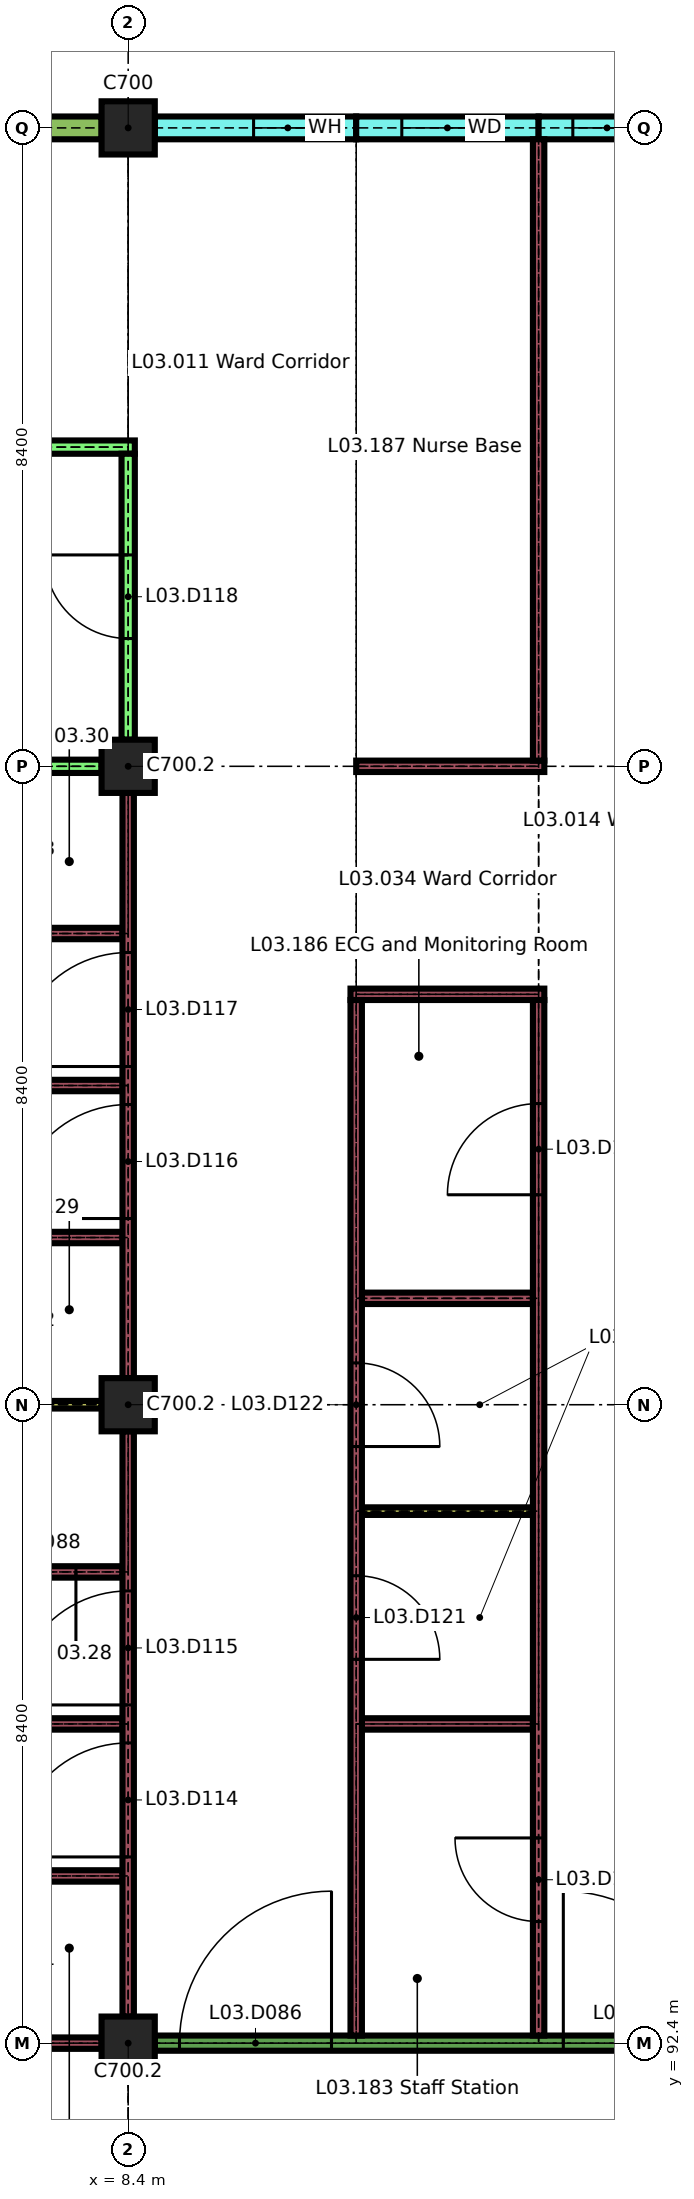
"""IFC4 building model, lengths in metres.
Left out: names, types, materials, properties, quantities, classifications, styles, units other than length and angle.
Written with IfcOpenShell. Run it as: python <this file> out.ifc"""

import sys

from ifc_helpers import new_model, si_unit, direction, frame, frame_2d, origin, origin_2d, place, context, subcontext, project, spatial, rectangle, extrude, element, fill, save


model = new_model("IFC4")
c1 = context("Model", 3, precision=1e-05, world=origin(), true_north=direction((0.0, 1.0)))
c2 = subcontext(c1, "Body", "Model", "MODEL_VIEW")
j1 = project(units=[si_unit("LENGTHUNIT", "METRE"), si_unit("PLANEANGLEUNIT", "RADIAN")], contexts=[c1])
p1 = place(None, origin())
s1 = spatial("IfcSite", under=j1, at=p1, CompositionType="ELEMENT")
p2 = place(p1, origin())
s2 = spatial("IfcBuilding", under=s1, at=p2, CompositionType="ELEMENT")
p3 = place(p2, frame((0.0, 0.0, 15.3)))
s3 = spatial("IfcBuildingStorey", under=s2, at=p3, CompositionType="ELEMENT", Elevation=15.3)
for number, where, z_axis, x_axis in (
    (1, (8.4, 92.4, 0.0), (0.0, 0.0, 1.0), (1.0, 0.0, 0.0)),
    (2, (8.4, 100.8, 0.0), (0.0, 0.0, 1.0), (1.0, 0.0, 0.0)),
    (3, (8.4, 109.2, 0.0), (0.0, 0.0, 1.0), (1.0, 0.0, 0.0)),
    (4, (8.4, 117.6, 0.0), (0.0, 0.0, 1.0), (1.0, 0.0, 0.0)),
):
    element("IfcColumn", number, at=place(p3, frame(where, z_axis=z_axis, x_axis=x_axis)), inside=s3, PredefinedType="COLUMN", context=c2, shape_type="SweptSolid", body=[
        extrude(rectangle(XDim=0.7, YDim=0.7, at=origin_2d()), origin(), (0.0, 0.0, 1.0), 3.26),
    ])
p4 = place(p3, frame((7.0, 117.6, 0.0), z_axis=(0.0, 0.0, 1.0), x_axis=(1.0, 0.0, 0.0)))
e5 = element("IfcWall", 5, at=p4, inside=s3, PredefinedType="SOLIDWALL", context=c2, shape_type="SweptSolid", body=[
    extrude(rectangle(XDim=1.05, YDim=0.3, at=frame_2d((0.525, 0.0))), origin(), (0.0, 0.0, 1.0), 2.96),
])
p5 = place(p3, frame((8.75, 117.6, 0.0), z_axis=(0.0, 0.0, 1.0), x_axis=(1.0, 0.0, 0.0)))
e6 = element("IfcWall", 6, at=p5, inside=s3, PredefinedType="SOLIDWALL", context=c2, shape_type="SweptSolid", body=[
    extrude(rectangle(XDim=2.65, YDim=0.3, at=frame_2d((1.325, 0.0))), origin(), (0.0, 0.0, 1.0), 3.26),
])
p6 = place(p5, frame((1.3, 0.0, 0.9)))
e7 = element("IfcOpeningElement", 7, at=p6, cuts=e6, PredefinedType="OPENING", context=c2, shape_type="SweptSolid", body=[
    extrude(rectangle(XDim=0.9, YDim=1.5, at=frame_2d((0.45, 0.75))), frame((0.0, 0.16, 0.0), z_axis=(0.0, -1.0, 0.0), x_axis=(1.0, 0.0, 0.0)), (0.0, 0.0, 1.0), 0.32),
])
p7 = place(p3, frame((11.4, 117.6, 0.0), z_axis=(0.0, 0.0, 1.0), x_axis=(1.0, 0.0, 0.0)))
e8 = element("IfcWall", 8, at=p7, inside=s3, PredefinedType="SOLIDWALL", context=c2, shape_type="SweptSolid", body=[
    extrude(rectangle(XDim=2.4, YDim=0.3, at=frame_2d((1.2, 0.0))), origin(), (0.0, 0.0, 1.0), 3.26),
])
p8 = place(p7, frame((0.6, 0.0, 0.9)))
e9 = element("IfcOpeningElement", 9, at=p8, cuts=e8, PredefinedType="OPENING", context=c2, shape_type="SweptSolid", body=[
    extrude(rectangle(XDim=1.2, YDim=1.5, at=frame_2d((0.6, 0.75))), frame((0.0, 0.16, 0.0), z_axis=(0.0, -1.0, 0.0), x_axis=(1.0, 0.0, 0.0)), (0.0, 0.0, 1.0), 0.32),
])
p9 = place(p3, frame((13.8, 117.6, 0.0), z_axis=(0.0, 0.0, 1.0), x_axis=(1.0, 0.0, 0.0)))
e10 = element("IfcWall", 10, at=p9, inside=s3, PredefinedType="SOLIDWALL", context=c2, shape_type="SweptSolid", body=[
    extrude(rectangle(XDim=3.0, YDim=0.3, at=frame_2d((1.5, 0.0))), origin(), (0.0, 0.0, 1.0), 3.26),
])
p10 = place(p9, frame((0.45, 0.0, 0.9)))
e11 = element("IfcOpeningElement", 11, at=p10, cuts=e10, PredefinedType="OPENING", context=c2, shape_type="SweptSolid", body=[
    extrude(rectangle(XDim=0.9, YDim=1.5, at=frame_2d((0.45, 0.75))), frame((0.0, 0.16, 0.0), z_axis=(0.0, -1.0, 0.0), x_axis=(1.0, 0.0, 0.0)), (0.0, 0.0, 1.0), 0.32),
])
p11 = place(p3, frame((0.35, 92.4, 0.0), z_axis=(0.0, 0.0, 1.0), x_axis=(1.0, 0.0, 0.0)))
e12 = element("IfcWall", 12, at=p11, inside=s3, PredefinedType="PARTITIONING", context=c2, shape_type="SweptSolid", body=[
    extrude(rectangle(XDim=7.7, YDim=0.15, at=frame_2d((3.85, 0.0))), origin(), (0.0, 0.0, 1.0), 3.26),
])
p12 = place(p3, frame((8.75, 92.4, 0.0), z_axis=(0.0, 0.0, 1.0), x_axis=(1.0, 0.0, 0.0)))
e13 = element("IfcWall", 13, at=p12, inside=s3, PredefinedType="PARTITIONING", context=c2, shape_type="SweptSolid", body=[
    extrude(rectangle(XDim=7.7, YDim=0.2, at=frame_2d((3.85, 0.0))), origin(), (0.0, 0.0, 1.0), 3.26),
])
p13 = place(p12, frame((0.325, 0.0, 0.0)))
e14 = element("IfcOpeningElement", 14, at=p13, cuts=e13, PredefinedType="OPENING", context=c2, shape_type="SweptSolid", body=[
    extrude(rectangle(XDim=2.0, YDim=2.4, at=frame_2d((1.0, 1.2))), frame((0.0, 0.11, 0.0), z_axis=(0.0, -1.0, 0.0), x_axis=(1.0, 0.0, 0.0)), (0.0, 0.0, 1.0), 0.22),
])
p14 = place(p12, frame((5.375, 0.0, 0.0)))
e15 = element("IfcOpeningElement", 15, at=p14, cuts=e13, PredefinedType="OPENING", context=c2, shape_type="SweptSolid", body=[
    extrude(rectangle(XDim=2.0, YDim=2.4, at=frame_2d((1.0, 1.2))), frame((0.0, 0.11, 0.0), z_axis=(0.0, -1.0, 0.0), x_axis=(1.0, 0.0, 0.0)), (0.0, 0.0, 1.0), 0.22),
])
p15 = place(p3, frame((5.925, 94.6, 0.0), z_axis=(0.0, 0.0, 1.0), x_axis=(1.0, 0.0, 0.0)))
e16 = element("IfcWall", 16, at=p15, inside=s3, PredefinedType="PARTITIONING", context=c2, shape_type="SweptSolid", body=[
    extrude(rectangle(XDim=2.4, YDim=0.15, at=frame_2d((1.2, 0.0))), origin(), (0.0, 0.0, 1.0), 3.26),
])
p16 = place(p3, frame((0.15, 96.6, 0.0), z_axis=(0.0, 0.0, 1.0), x_axis=(1.0, 0.0, 0.0)))
e17 = element("IfcWall", 17, at=p16, inside=s3, PredefinedType="PARTITIONING", context=c2, shape_type="SweptSolid", body=[
    extrude(rectangle(XDim=8.175, YDim=0.15, at=frame_2d((4.087, 0.0))), origin(), (0.0, 0.0, 1.0), 3.26),
])
p17 = place(p3, frame((11.475, 96.6, 0.0), z_axis=(0.0, 0.0, 1.0), x_axis=(1.0, 0.0, 0.0)))
e18 = element("IfcWall", 18, at=p17, inside=s3, PredefinedType="PARTITIONING", context=c2, shape_type="SweptSolid", body=[
    extrude(rectangle(XDim=2.25, YDim=0.15, at=frame_2d((1.125, 0.0))), origin(), (0.0, 0.0, 1.0), 3.26),
])
p18 = place(p3, frame((5.925, 98.6, 0.0), z_axis=(0.0, 0.0, 1.0), x_axis=(1.0, 0.0, 0.0)))
e19 = element("IfcWall", 19, at=p18, inside=s3, PredefinedType="PARTITIONING", context=c2, shape_type="SweptSolid", body=[
    extrude(rectangle(XDim=2.4, YDim=0.15, at=frame_2d((1.2, 0.0))), origin(), (0.0, 0.0, 1.0), 3.26),
])
p19 = place(p18, frame((0.688, 0.0, 0.0)))
e20 = element("IfcOpeningElement", 20, at=p19, cuts=e19, PredefinedType="OPENING", context=c2, shape_type="SweptSolid", body=[
    extrude(rectangle(XDim=1.1, YDim=2.1, at=frame_2d((0.55, 1.05))), frame((0.0, 0.085, 0.0), z_axis=(0.0, -1.0, 0.0), x_axis=(1.0, 0.0, 0.0)), (0.0, 0.0, 1.0), 0.17),
])
p20 = place(p3, frame((11.475, 99.4, 0.0), z_axis=(0.0, 0.0, 1.0), x_axis=(1.0, 0.0, 0.0)))
e21 = element("IfcWall", 21, at=p20, inside=s3, PredefinedType="PARTITIONING", context=c2, shape_type="SweptSolid", body=[
    extrude(rectangle(XDim=2.25, YDim=0.1, at=frame_2d((1.125, 0.0))), origin(), (0.0, 0.0, 1.0), 3.26),
])
p21 = place(p3, frame((6.0, 100.8, 0.0), z_axis=(0.0, 0.0, 1.0), x_axis=(1.0, 0.0, 0.0)))
e22 = element("IfcWall", 22, at=p21, inside=s3, PredefinedType="PARTITIONING", context=c2, shape_type="SweptSolid", body=[
    extrude(rectangle(XDim=2.05, YDim=0.1, at=frame_2d((1.025, 0.0))), origin(), (0.0, 0.0, 1.0), 3.26),
])
p22 = place(p3, frame((11.475, 102.2, 0.0), z_axis=(0.0, 0.0, 1.0), x_axis=(1.0, 0.0, 0.0)))
e23 = element("IfcWall", 23, at=p22, inside=s3, PredefinedType="PARTITIONING", context=c2, shape_type="SweptSolid", body=[
    extrude(rectangle(XDim=2.25, YDim=0.15, at=frame_2d((1.125, 0.0))), origin(), (0.0, 0.0, 1.0), 3.26),
])
p23 = place(p3, frame((5.925, 103.0, 0.0), z_axis=(0.0, 0.0, 1.0), x_axis=(1.0, 0.0, 0.0)))
e24 = element("IfcWall", 24, at=p23, inside=s3, PredefinedType="PARTITIONING", context=c2, shape_type="SweptSolid", body=[
    extrude(rectangle(XDim=2.4, YDim=0.15, at=frame_2d((1.2, 0.0))), origin(), (0.0, 0.0, 1.0), 3.26),
])
p24 = place(p3, frame((0.15, 105.0, 0.0), z_axis=(0.0, 0.0, 1.0), x_axis=(1.0, 0.0, 0.0)))
e25 = element("IfcWall", 25, at=p24, inside=s3, PredefinedType="PARTITIONING", context=c2, shape_type="SweptSolid", body=[
    extrude(rectangle(XDim=8.175, YDim=0.15, at=frame_2d((4.087, 0.0))), origin(), (0.0, 0.0, 1.0), 3.26),
])
p25 = place(p3, frame((11.325, 106.2, 0.0), z_axis=(0.0, 0.0, 1.0), x_axis=(1.0, 0.0, 0.0)))
e26 = element("IfcWall", 26, at=p25, inside=s3, PredefinedType="PARTITIONING", context=c2, shape_type="SweptSolid", body=[
    extrude(rectangle(XDim=2.55, YDim=0.15, at=frame_2d((1.275, 0.0))), origin(), (0.0, 0.0, 1.0), 3.26),
])
p26 = place(p3, frame((5.925, 107.0, 0.0), z_axis=(0.0, 0.0, 1.0), x_axis=(1.0, 0.0, 0.0)))
e27 = element("IfcWall", 27, at=p26, inside=s3, PredefinedType="PARTITIONING", context=c2, shape_type="SweptSolid", body=[
    extrude(rectangle(XDim=2.4, YDim=0.15, at=frame_2d((1.2, 0.0))), origin(), (0.0, 0.0, 1.0), 3.26),
])
p27 = place(p3, frame((0.35, 109.2, 0.0), z_axis=(0.0, 0.0, 1.0), x_axis=(1.0, 0.0, 0.0)))
e28 = element("IfcWall", 28, at=p27, inside=s3, PredefinedType="PARTITIONING", context=c2, shape_type="SweptSolid", body=[
    extrude(rectangle(XDim=7.7, YDim=0.175, at=frame_2d((3.85, 0.0))), origin(), (0.0, 0.0, 1.0), 3.26),
])
p28 = place(p3, frame((11.4, 109.2, 0.0), z_axis=(0.0, 0.0, 1.0), x_axis=(1.0, 0.0, 0.0)))
e29 = element("IfcWall", 29, at=p28, inside=s3, PredefinedType="PARTITIONING", context=c2, shape_type="SweptSolid", body=[
    extrude(rectangle(XDim=2.475, YDim=0.15, at=frame_2d((1.238, 0.0))), origin(), (0.0, 0.0, 1.0), 3.26),
])
p29 = place(p3, frame((0.15, 113.4, 0.0), z_axis=(0.0, 0.0, 1.0), x_axis=(1.0, 0.0, 0.0)))
e30 = element("IfcWall", 30, at=p29, inside=s3, PredefinedType="PARTITIONING", context=c2, shape_type="SweptSolid", body=[
    extrude(rectangle(XDim=8.338, YDim=0.175, at=frame_2d((4.169, 0.0))), origin(), (0.0, 0.0, 1.0), 3.26),
])
p30 = place(p3, frame((8.4, 92.75, 0.0), z_axis=(0.0, 0.0, 1.0), x_axis=(0.0, 1.0, 0.0)))
e31 = element("IfcWall", 31, at=p30, inside=s3, PredefinedType="PARTITIONING", context=c2, shape_type="SweptSolid", body=[
    extrude(rectangle(XDim=7.7, YDim=0.15, at=frame_2d((3.85, 0.0))), origin(), (0.0, 0.0, 1.0), 3.26),
])
p31 = place(p30, frame((2.1, 0.0, 0.0)))
e32 = element("IfcOpeningElement", 32, at=p31, cuts=e31, PredefinedType="OPENING", context=c2, shape_type="SweptSolid", body=[
    extrude(rectangle(XDim=1.5, YDim=2.4, at=frame_2d((0.75, 1.2))), frame((0.0, 0.085, 0.0), z_axis=(0.0, -1.0, 0.0), x_axis=(1.0, 0.0, 0.0)), (0.0, 0.0, 1.0), 0.17),
])
p32 = place(p30, frame((4.1, 0.0, 0.0)))
e33 = element("IfcOpeningElement", 33, at=p32, cuts=e31, PredefinedType="OPENING", context=c2, shape_type="SweptSolid", body=[
    extrude(rectangle(XDim=1.5, YDim=2.4, at=frame_2d((0.75, 1.2))), frame((0.0, 0.085, 0.0), z_axis=(0.0, -1.0, 0.0), x_axis=(1.0, 0.0, 0.0)), (0.0, 0.0, 1.0), 0.17),
])
p33 = place(p3, frame((8.4, 101.15, 0.0), z_axis=(0.0, 0.0, 1.0), x_axis=(0.0, 1.0, 0.0)))
e34 = element("IfcWall", 34, at=p33, inside=s3, PredefinedType="PARTITIONING", context=c2, shape_type="SweptSolid", body=[
    extrude(rectangle(XDim=7.7, YDim=0.15, at=frame_2d((3.85, 0.0))), origin(), (0.0, 0.0, 1.0), 3.26),
])
p34 = place(p33, frame((2.1, 0.0, 0.0)))
e35 = element("IfcOpeningElement", 35, at=p34, cuts=e34, PredefinedType="OPENING", context=c2, shape_type="SweptSolid", body=[
    extrude(rectangle(XDim=1.5, YDim=2.4, at=frame_2d((0.75, 1.2))), frame((0.0, 0.085, 0.0), z_axis=(0.0, -1.0, 0.0), x_axis=(1.0, 0.0, 0.0)), (0.0, 0.0, 1.0), 0.17),
])
p35 = place(p33, frame((4.1, 0.0, 0.0)))
e36 = element("IfcOpeningElement", 36, at=p35, cuts=e34, PredefinedType="OPENING", context=c2, shape_type="SweptSolid", body=[
    extrude(rectangle(XDim=1.5, YDim=2.4, at=frame_2d((0.75, 1.2))), frame((0.0, 0.085, 0.0), z_axis=(0.0, -1.0, 0.0), x_axis=(1.0, 0.0, 0.0)), (0.0, 0.0, 1.0), 0.17),
])
p36 = place(p3, frame((8.4, 109.55, 0.0), z_axis=(0.0, 0.0, 1.0), x_axis=(0.0, 1.0, 0.0)))
e37 = element("IfcWall", 37, at=p36, inside=s3, PredefinedType="PARTITIONING", context=c2, shape_type="SweptSolid", body=[
    extrude(rectangle(XDim=3.762, YDim=0.175, at=frame_2d((1.881, 0.0))), origin(), (0.0, 0.0, 1.0), 3.26),
])
p37 = place(p36, frame((1.331, 0.0, 0.0)))
e38 = element("IfcOpeningElement", 38, at=p37, cuts=e37, PredefinedType="OPENING", context=c2, shape_type="SweptSolid", body=[
    extrude(rectangle(XDim=1.1, YDim=2.1, at=frame_2d((0.55, 1.05))), frame((0.0, 0.097, 0.0), z_axis=(0.0, -1.0, 0.0), x_axis=(1.0, 0.0, 0.0)), (0.0, 0.0, 1.0), 0.195),
])
p38 = place(p3, frame((11.4, 92.5, 0.0), z_axis=(0.0, 0.0, 1.0), x_axis=(0.0, 1.0, 0.0)))
e39 = element("IfcWall", 39, at=p38, inside=s3, PredefinedType="PARTITIONING", context=c2, shape_type="SweptSolid", body=[
    extrude(rectangle(XDim=13.625, YDim=0.15, at=frame_2d((6.812, 0.0))), origin(), (0.0, 0.0, 1.0), 3.26),
])
p39 = place(p38, frame((4.95, 0.0, 0.0)))
e40 = element("IfcOpeningElement", 40, at=p39, cuts=e39, PredefinedType="OPENING", context=c2, shape_type="SweptSolid", body=[
    extrude(rectangle(XDim=1.1, YDim=2.1, at=frame_2d((0.55, 1.05))), frame((0.0, 0.085, 0.0), z_axis=(0.0, -1.0, 0.0), x_axis=(1.0, 0.0, 0.0)), (0.0, 0.0, 1.0), 0.17),
])
p40 = place(p38, frame((7.75, 0.0, 0.0)))
e41 = element("IfcOpeningElement", 41, at=p40, cuts=e39, PredefinedType="OPENING", context=c2, shape_type="SweptSolid", body=[
    extrude(rectangle(XDim=1.1, YDim=2.1, at=frame_2d((0.55, 1.05))), frame((0.0, 0.085, 0.0), z_axis=(0.0, -1.0, 0.0), x_axis=(1.0, 0.0, 0.0)), (0.0, 0.0, 1.0), 0.17),
])
p41 = place(p3, frame((13.8, 92.5, 0.0), z_axis=(0.0, 0.0, 1.0), x_axis=(0.0, 1.0, 0.0)))
e42 = element("IfcWall", 42, at=p41, inside=s3, PredefinedType="PARTITIONING", context=c2, shape_type="SweptSolid", body=[
    extrude(rectangle(XDim=13.625, YDim=0.15, at=frame_2d((6.812, 0.0))), origin(), (0.0, 0.0, 1.0), 3.26),
])
p42 = place(p41, frame((1.5, 0.0, 0.0)))
e43 = element("IfcOpeningElement", 43, at=p42, cuts=e42, PredefinedType="OPENING", context=c2, shape_type="SweptSolid", body=[
    extrude(rectangle(XDim=1.1, YDim=2.1, at=frame_2d((0.55, 1.05))), frame((0.0, 0.085, 0.0), z_axis=(0.0, -1.0, 0.0), x_axis=(1.0, 0.0, 0.0)), (0.0, 0.0, 1.0), 0.17),
])
p43 = place(p41, frame((11.062, 0.0, 0.0)))
e44 = element("IfcOpeningElement", 44, at=p43, cuts=e42, PredefinedType="OPENING", context=c2, shape_type="SweptSolid", body=[
    extrude(rectangle(XDim=1.2, YDim=2.1, at=frame_2d((0.6, 1.05))), frame((0.0, 0.085, 0.0), z_axis=(0.0, -1.0, 0.0), x_axis=(1.0, 0.0, 0.0)), (0.0, 0.0, 1.0), 0.17),
])
p44 = place(p3, frame((13.8, 109.275, 0.0), z_axis=(0.0, 0.0, 1.0), x_axis=(0.0, 1.0, 0.0)))
e45 = element("IfcWall", 45, at=p44, inside=s3, PredefinedType="PARTITIONING", context=c2, shape_type="SweptSolid", body=[
    extrude(rectangle(XDim=8.175, YDim=0.15, at=frame_2d((4.087, 0.0))), origin(), (0.0, 0.0, 1.0), 3.26),
])
p45 = place(p6, origin())
e46 = element("IfcWindow", 46, at=p45, inside=s3, PartitioningType="SINGLE_PANEL", PredefinedType="WINDOW", context=c2, shape_type="SweptSolid", body=[
    extrude(rectangle(XDim=0.9, YDim=1.5, at=frame_2d((0.45, 0.75))), frame((0.0, 0.03, 0.0), z_axis=(0.0, -1.0, 0.0), x_axis=(1.0, 0.0, 0.0)), (0.0, 0.0, 1.0), 0.06),
])
fill(e7, e46)
p46 = place(p8, origin())
e47 = element("IfcWindow", 47, at=p46, inside=s3, PartitioningType="SINGLE_PANEL", PredefinedType="WINDOW", context=c2, shape_type="SweptSolid", body=[
    extrude(rectangle(XDim=1.2, YDim=1.5, at=frame_2d((0.6, 0.75))), frame((0.0, 0.03, 0.0), z_axis=(0.0, -1.0, 0.0), x_axis=(1.0, 0.0, 0.0)), (0.0, 0.0, 1.0), 0.06),
])
fill(e9, e47)
p47 = place(p10, origin())
e48 = element("IfcWindow", 48, at=p47, inside=s3, PartitioningType="SINGLE_PANEL", PredefinedType="WINDOW", context=c2, shape_type="SweptSolid", body=[
    extrude(rectangle(XDim=0.9, YDim=1.5, at=frame_2d((0.45, 0.75))), frame((0.0, 0.03, 0.0), z_axis=(0.0, -1.0, 0.0), x_axis=(1.0, 0.0, 0.0)), (0.0, 0.0, 1.0), 0.06),
])
fill(e11, e48)
p48 = place(p13, origin())
e49 = element("IfcDoor", 49, at=p48, inside=s3, OperationType="SINGLE_SWING_LEFT", PredefinedType="DOOR", context=c2, shape_type="SweptSolid", body=[
    extrude(rectangle(XDim=2.0, YDim=2.4, at=frame_2d((1.0, 1.2))), frame((0.0, 0.03, 0.0), z_axis=(0.0, -1.0, 0.0), x_axis=(1.0, 0.0, 0.0)), (0.0, 0.0, 1.0), 0.06),
])
fill(e14, e49)
p49 = place(p14, origin())
e50 = element("IfcDoor", 50, at=p49, inside=s3, OperationType="SINGLE_SWING_RIGHT", PredefinedType="DOOR", context=c2, shape_type="SweptSolid", body=[
    extrude(rectangle(XDim=2.0, YDim=2.4, at=frame_2d((1.0, 1.2))), frame((0.0, 0.03, 0.0), z_axis=(0.0, -1.0, 0.0), x_axis=(1.0, 0.0, 0.0)), (0.0, 0.0, 1.0), 0.06),
])
fill(e15, e50)
p50 = place(p19, origin())
e51 = element("IfcDoor", 51, at=p50, inside=s3, OperationType="SINGLE_SWING_RIGHT", PredefinedType="DOOR", context=c2, shape_type="SweptSolid", body=[
    extrude(rectangle(XDim=1.1, YDim=2.1, at=frame_2d((0.55, 1.05))), frame((0.0, 0.025, 0.0), z_axis=(0.0, -1.0, 0.0), x_axis=(1.0, 0.0, 0.0)), (0.0, 0.0, 1.0), 0.05),
])
fill(e20, e51)
p51 = place(p31, origin())
e52 = element("IfcDoor", 52, at=p51, inside=s3, OperationType="SINGLE_SWING_RIGHT", PredefinedType="DOOR", context=c2, shape_type="SweptSolid", body=[
    extrude(rectangle(XDim=1.5, YDim=2.4, at=frame_2d((0.75, 1.2))), frame((0.0, 0.03, 0.0), z_axis=(0.0, -1.0, 0.0), x_axis=(1.0, 0.0, 0.0)), (0.0, 0.0, 1.0), 0.06),
])
fill(e32, e52)
p52 = place(p32, origin())
e53 = element("IfcDoor", 53, at=p52, inside=s3, OperationType="SINGLE_SWING_RIGHT", PredefinedType="DOOR", context=c2, shape_type="SweptSolid", body=[
    extrude(rectangle(XDim=1.5, YDim=2.4, at=frame_2d((0.75, 1.2))), frame((0.0, 0.03, 0.0), z_axis=(0.0, -1.0, 0.0), x_axis=(1.0, 0.0, 0.0)), (0.0, 0.0, 1.0), 0.06),
])
fill(e33, e53)
p53 = place(p34, origin())
e54 = element("IfcDoor", 54, at=p53, inside=s3, OperationType="SINGLE_SWING_RIGHT", PredefinedType="DOOR", context=c2, shape_type="SweptSolid", body=[
    extrude(rectangle(XDim=1.5, YDim=2.4, at=frame_2d((0.75, 1.2))), frame((0.0, 0.03, 0.0), z_axis=(0.0, -1.0, 0.0), x_axis=(1.0, 0.0, 0.0)), (0.0, 0.0, 1.0), 0.06),
])
fill(e35, e54)
p54 = place(p35, origin())
e55 = element("IfcDoor", 55, at=p54, inside=s3, OperationType="SINGLE_SWING_RIGHT", PredefinedType="DOOR", context=c2, shape_type="SweptSolid", body=[
    extrude(rectangle(XDim=1.5, YDim=2.4, at=frame_2d((0.75, 1.2))), frame((0.0, 0.03, 0.0), z_axis=(0.0, -1.0, 0.0), x_axis=(1.0, 0.0, 0.0)), (0.0, 0.0, 1.0), 0.06),
])
fill(e36, e55)
p55 = place(p37, origin())
e56 = element("IfcDoor", 56, at=p55, inside=s3, OperationType="SINGLE_SWING_LEFT", PredefinedType="DOOR", context=c2, shape_type="SweptSolid", body=[
    extrude(rectangle(XDim=1.1, YDim=2.1, at=frame_2d((0.55, 1.05))), frame((0.0, 0.035, 0.0), z_axis=(0.0, -1.0, 0.0), x_axis=(1.0, 0.0, 0.0)), (0.0, 0.0, 1.0), 0.07),
])
fill(e38, e56)
p56 = place(p39, origin())
e57 = element("IfcDoor", 57, at=p56, inside=s3, OperationType="SINGLE_SWING_LEFT", PredefinedType="DOOR", context=c2, shape_type="SweptSolid", body=[
    extrude(rectangle(XDim=1.1, YDim=2.1, at=frame_2d((0.55, 1.05))), frame((0.0, 0.025, 0.0), z_axis=(0.0, -1.0, 0.0), x_axis=(1.0, 0.0, 0.0)), (0.0, 0.0, 1.0), 0.05),
])
fill(e40, e57)
p57 = place(p40, origin())
e58 = element("IfcDoor", 58, at=p57, inside=s3, OperationType="SINGLE_SWING_LEFT", PredefinedType="DOOR", context=c2, shape_type="SweptSolid", body=[
    extrude(rectangle(XDim=1.1, YDim=2.1, at=frame_2d((0.55, 1.05))), frame((0.0, 0.025, 0.0), z_axis=(0.0, -1.0, 0.0), x_axis=(1.0, 0.0, 0.0)), (0.0, 0.0, 1.0), 0.05),
])
fill(e41, e58)
p58 = place(p42, origin())
e59 = element("IfcDoor", 59, at=p58, inside=s3, OperationType="SINGLE_SWING_LEFT", PredefinedType="DOOR", context=c2, shape_type="SweptSolid", body=[
    extrude(rectangle(XDim=1.1, YDim=2.1, at=frame_2d((0.55, 1.05))), frame((0.0, 0.025, 0.0), z_axis=(0.0, -1.0, 0.0), x_axis=(1.0, 0.0, 0.0)), (0.0, 0.0, 1.0), 0.05),
])
fill(e43, e59)
p59 = place(p43, origin())
e60 = element("IfcDoor", 60, at=p59, inside=s3, OperationType="SINGLE_SWING_RIGHT", PredefinedType="DOOR", context=c2, shape_type="SweptSolid", body=[
    extrude(rectangle(XDim=1.2, YDim=2.1, at=frame_2d((0.6, 1.05))), frame((0.0, 0.025, 0.0), z_axis=(0.0, -1.0, 0.0), x_axis=(1.0, 0.0, 0.0)), (0.0, 0.0, 1.0), 0.05),
])
fill(e44, e60)
save(model, sys.argv[1])
